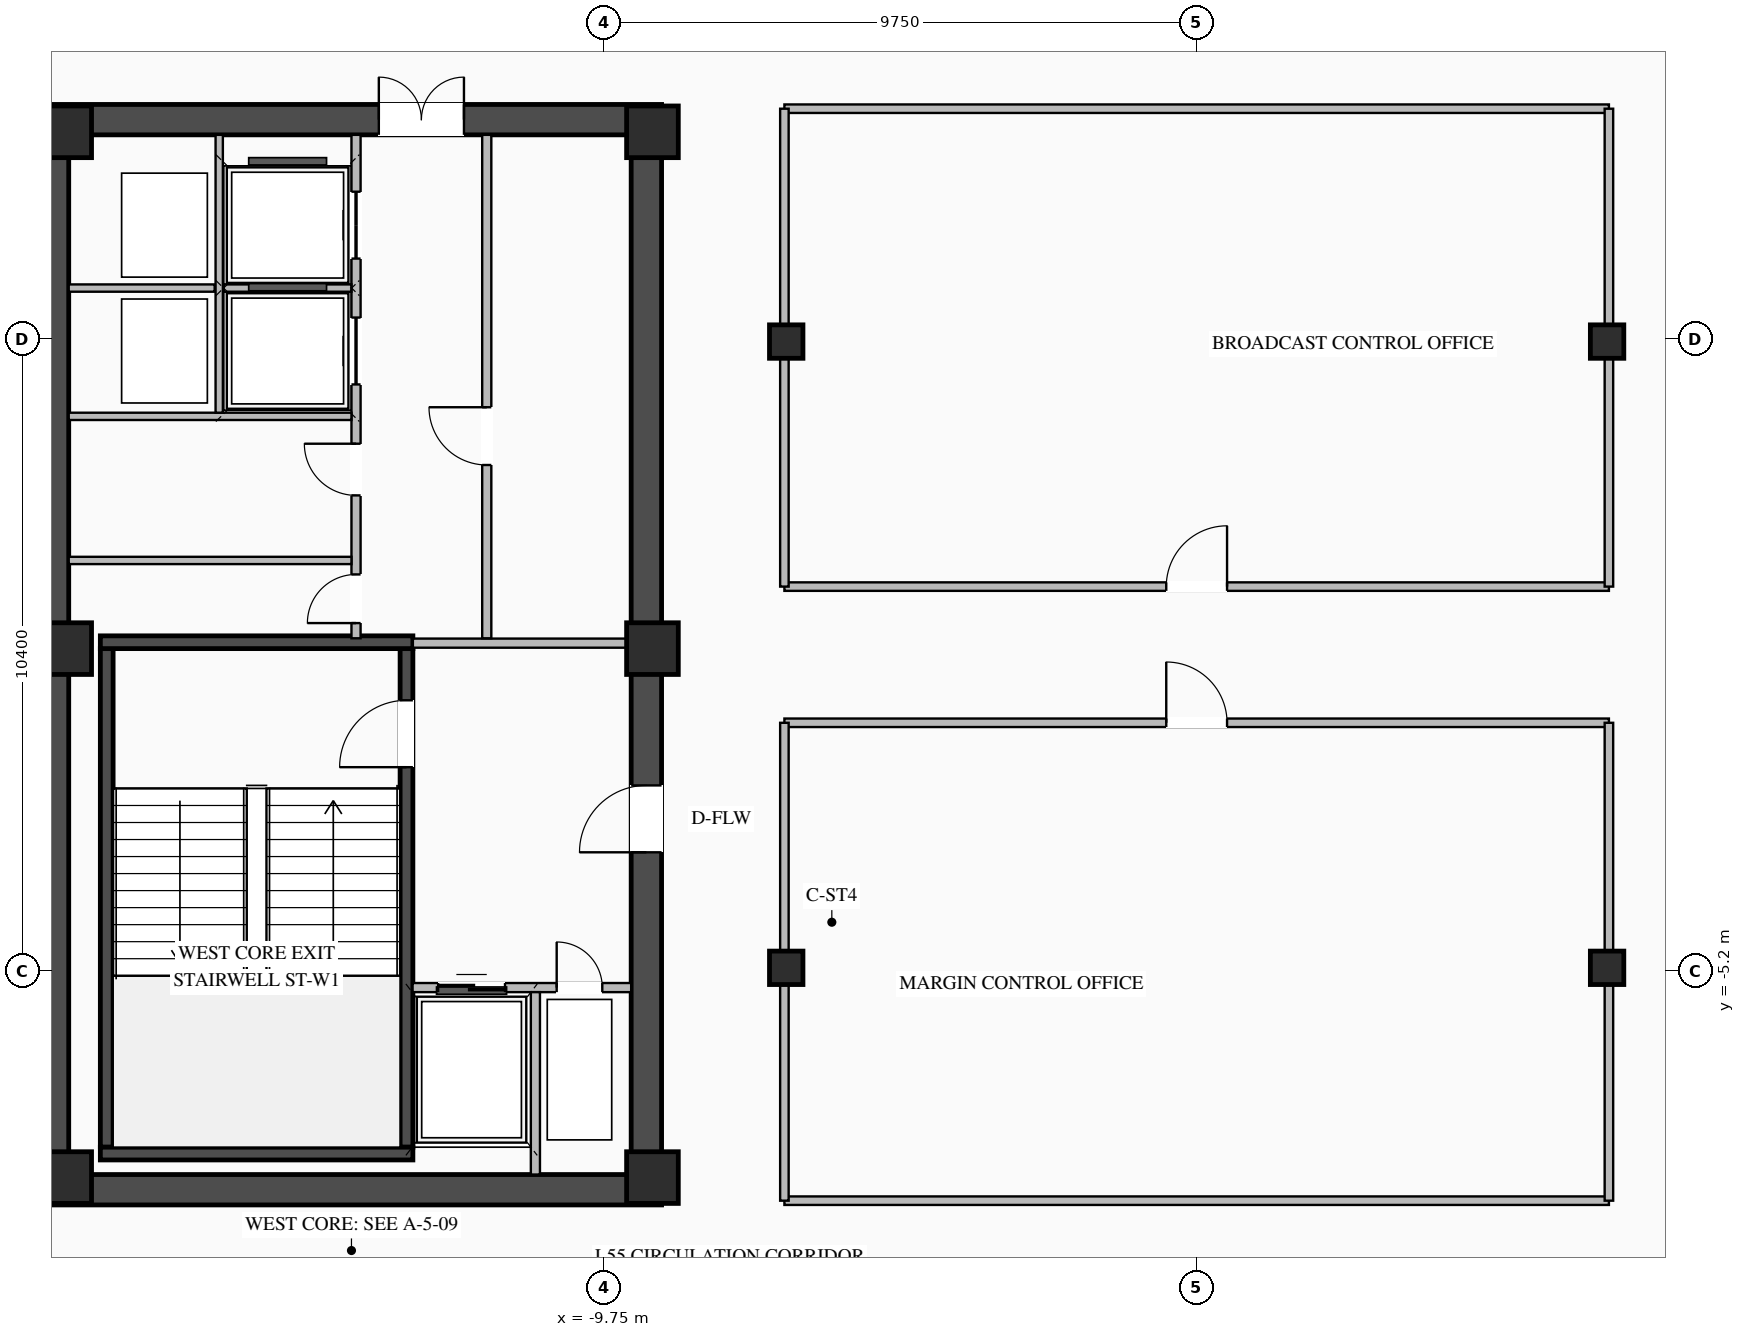
"""IFC4 building model, lengths in metres.
Left out: names, types, materials, properties, quantities, classifications, styles, units other than length and angle.
Written with IfcOpenShell. Run it as: python <this file> out.ifc"""

import sys

from ifc_helpers import new_model, si_unit, direction, frame, frame_2d, origin, origin_2d, place, context, subcontext, project, spatial, rectangle, i_section, extrude, element, fill, save


model = new_model("IFC4")
c1 = context("Model", 3, precision=1e-05, world=origin(), true_north=direction((0.0, 1.0)))
c2 = subcontext(c1, "Body", "Model", "MODEL_VIEW")
j1 = project(units=[si_unit("LENGTHUNIT", "METRE"), si_unit("PLANEANGLEUNIT", "RADIAN")], contexts=[c1])
p1 = place(None, origin())
s1 = spatial("IfcSite", under=j1, at=p1, CompositionType="ELEMENT")
p2 = place(p1, origin())
s2 = spatial("IfcBuilding", under=s1, at=p2, CompositionType="ELEMENT")
p3 = place(p2, frame((0.0, 0.0, 204.3)))
s3 = spatial("IfcBuildingStorey", under=s2, at=p3, CompositionType="ELEMENT", Elevation=204.3)
p4 = place(p3, frame((-19.05, -8.8, 0.0), z_axis=(0.0, 0.0, 1.0), x_axis=(1.0, 0.0, 0.0)))
e1 = element("IfcWall", 1, at=p4, inside=s3, PredefinedType="SHEAR", context=c2, shape_type="SweptSolid", body=[
    extrude(rectangle(XDim=10.25, YDim=0.5, at=frame_2d((5.125, 0.0))), origin(), (0.0, 0.0, 1.0), 4.02),
])
p5 = place(p3, frame((-19.05, 8.8, 0.0), z_axis=(0.0, 0.0, 1.0), x_axis=(1.0, 0.0, 0.0)))
e2 = element("IfcWall", 2, at=p5, inside=s3, PredefinedType="SHEAR", context=c2, shape_type="SweptSolid", body=[
    extrude(rectangle(XDim=10.25, YDim=0.5, at=frame_2d((5.125, 0.0))), origin(), (0.0, 0.0, 1.0), 4.02),
])
p6 = place(p5, frame((5.6, 0.0, 0.0)))
e3 = element("IfcOpeningElement", 3, at=p6, cuts=e2, PredefinedType="OPENING", context=c2, shape_type="SweptSolid", body=[
    extrude(rectangle(XDim=1.4, YDim=2.05, at=frame_2d((0.7, 1.025))), frame((0.0, 0.26, 0.0), z_axis=(0.0, -1.0, 0.0), x_axis=(1.0, 0.0, 0.0)), (0.0, 0.0, 1.0), 0.52),
])
p7 = place(p3, frame((-18.8, -8.55, 0.0), z_axis=(0.0, 0.0, 1.0), x_axis=(0.0, 1.0, 0.0)))
e4 = element("IfcWall", 4, at=p7, inside=s3, PredefinedType="SHEAR", context=c2, shape_type="SweptSolid", body=[
    extrude(rectangle(XDim=17.1, YDim=0.5, at=frame_2d((8.55, 0.0))), origin(), (0.0, 0.0, 1.0), 4.02),
])
p8 = place(p3, frame((-9.05, -8.55, 0.0), z_axis=(0.0, 0.0, 1.0), x_axis=(0.0, 1.0, 0.0)))
e5 = element("IfcWall", 5, at=p8, inside=s3, PredefinedType="SHEAR", context=c2, shape_type="SweptSolid", body=[
    extrude(rectangle(XDim=17.1, YDim=0.5, at=frame_2d((8.55, 0.0))), origin(), (0.0, 0.0, 1.0), 4.02),
])
p9 = place(p8, frame((5.3, 0.0, 0.0)))
e6 = element("IfcOpeningElement", 6, at=p9, cuts=e5, PredefinedType="OPENING", context=c2, shape_type="SweptSolid", body=[
    extrude(rectangle(XDim=1.1, YDim=2.08, at=frame_2d((0.55, 1.04))), frame((0.0, 0.26, 0.0), z_axis=(0.0, -1.0, 0.0), x_axis=(1.0, 0.0, 0.0)), (0.0, 0.0, 1.0), 0.52),
])
p10 = place(p3, frame((-12.995, -8.1, 0.0), z_axis=(0.0, 0.0, 1.0), x_axis=(0.0, 1.0, 0.0)))
e7 = element("IfcWall", 7, at=p10, inside=s3, PredefinedType="SHEAR", context=c2, shape_type="SweptSolid", body=[
    extrude(rectangle(XDim=8.2, YDim=0.21, at=frame_2d((4.1, 0.0))), origin(), (0.0, 0.0, 1.0), 4.02),
])
p11 = place(p10, frame((6.25, 0.0, 0.0)))
e8 = element("IfcOpeningElement", 8, at=p11, cuts=e7, PredefinedType="OPENING", context=c2, shape_type="SweptSolid", body=[
    extrude(rectangle(XDim=1.1, YDim=2.15, at=frame_2d((0.55, 1.075))), frame((0.0, 0.115, 0.0), z_axis=(0.0, -1.0, 0.0), x_axis=(1.0, 0.0, 0.0)), (0.0, 0.0, 1.0), 0.23),
])
p12 = place(p3, frame((-17.925, -8.1, 0.0), z_axis=(0.0, 0.0, 1.0), x_axis=(0.0, 1.0, 0.0)))
e9 = element("IfcWall", 9, at=p12, inside=s3, PredefinedType="SHEAR", context=c2, shape_type="SweptSolid", body=[
    extrude(rectangle(XDim=8.2, YDim=0.21, at=frame_2d((4.1, 0.0))), origin(), (0.0, 0.0, 1.0), 4.02),
])
for number, where, z_axis, x_axis in (
    (10, (-18.03, -8.205, 0.0), (0.0, 0.0, 1.0), (1.0, 0.0, 0.0)),
    (11, (-12.89, 0.205, 0.0), (0.0, 0.0, 1.0), (-1.0, 0.0, 0.0)),
):
    element("IfcWall", number, at=place(p3, frame(where, z_axis=z_axis, x_axis=x_axis)), inside=s3, PredefinedType="SHEAR", context=c2, shape_type="SweptSolid", body=[
        extrude(rectangle(XDim=5.14, YDim=0.21, at=frame_2d((2.57, 0.0))), origin(), (0.0, 0.0, 1.0), 4.02),
    ])
for number, where, z_axis, x_axis in (
    (12, (-8.95, -8.6, 0.0), (0.0, 0.0, 1.0), (1.0, 0.0, 0.0)),
    (13, (-8.95, 0.1, 0.0), (0.0, 0.0, 1.0), (1.0, 0.0, 0.0)),
    (14, (-8.95, 8.6, 0.0), (0.0, 0.0, 1.0), (1.0, 0.0, 0.0)),
    (15, (-18.6, -8.6, 0.0), (0.0, 0.0, 1.0), (1.0, 0.0, 0.0)),
    (16, (-18.6, 0.1, 0.0), (0.0, 0.0, 1.0), (1.0, 0.0, 0.0)),
    (17, (-18.6, 8.6, 0.0), (0.0, 0.0, 1.0), (1.0, 0.0, 0.0)),
):
    element("IfcColumn", number, at=place(p3, frame(where, z_axis=z_axis, x_axis=x_axis)), inside=s3, PredefinedType="COLUMN", context=c2, shape_type="SweptSolid", body=[
        extrude(rectangle(XDim=0.85, YDim=0.85, at=origin_2d()), origin(), (0.0, 0.0, 1.0), 4.2),
    ])
for number, where, z_axis, x_axis in (
    (18, (-6.75, -5.15, 0.0), (0.0, 0.0, 1.0), (1.0, 0.0, 0.0)),
    (19, (-6.75, 5.15, 0.0), (0.0, 0.0, 1.0), (1.0, 0.0, 0.0)),
    (20, (6.75, -5.15, 0.0), (0.0, 0.0, 1.0), (1.0, 0.0, 0.0)),
    (21, (6.75, 5.15, 0.0), (0.0, 0.0, 1.0), (1.0, 0.0, 0.0)),
):
    element("IfcColumn", number, at=place(p3, frame(where, z_axis=z_axis, x_axis=x_axis)), inside=s3, PredefinedType="COLUMN", context=c2, shape_type="SweptSolid", body=[
        extrude(i_section(OverallWidth=0.55, OverallDepth=0.55, WebThickness=0.024, FlangeThickness=0.036, at=origin_2d()), origin(), (0.0, 0.0, 1.0), 4.2),
    ])
p13 = place(p3, frame((-12.895, -5.475, 0.0), z_axis=(0.0, 0.0, 1.0), x_axis=(1.0, 0.0, 0.0)))
e22 = element("IfcWall", 22, at=p13, inside=s3, PredefinedType="STANDARD", context=c2, shape_type="SweptSolid", body=[
    extrude(rectangle(XDim=3.595, YDim=0.15, at=frame_2d((1.797, 0.0))), origin(), (0.0, 0.0, 1.0), 4.0),
])
p14 = place(p13, frame((0.42, 0.0, 0.0)))
e23 = element("IfcOpeningElement", 23, at=p14, cuts=e22, PredefinedType="OPENING", context=c2, shape_type="SweptSolid", body=[
    extrude(rectangle(XDim=1.1, YDim=2.15, at=frame_2d((0.55, 1.075))), frame((0.0, 0.085, 0.0), z_axis=(0.0, -1.0, 0.0), x_axis=(1.0, 0.0, 0.0)), (0.0, 0.0, 1.0), 0.17),
])
p15 = place(p13, frame((2.37, 0.0, 0.0)))
e24 = element("IfcOpeningElement", 24, at=p15, cuts=e22, PredefinedType="OPENING", context=c2, shape_type="SweptSolid", body=[
    extrude(rectangle(XDim=0.75, YDim=2.05, at=frame_2d((0.375, 1.025))), frame((0.0, 0.085, 0.0), z_axis=(0.0, -1.0, 0.0), x_axis=(1.0, 0.0, 0.0)), (0.0, 0.0, 1.0), 0.17),
])
p16 = place(p3, frame((-10.875, -8.55, 0.0), z_axis=(0.0, 0.0, 1.0), x_axis=(0.0, 1.0, 0.0)))
e25 = element("IfcWall", 25, at=p16, inside=s3, PredefinedType="STANDARD", context=c2, shape_type="SweptSolid", body=[
    extrude(rectangle(XDim=3.0, YDim=0.15, at=frame_2d((1.5, 0.0))), origin(), (0.0, 0.0, 1.0), 4.0),
])
p17 = place(p3, frame((-12.89, 0.19, 0.0), z_axis=(0.0, 0.0, 1.0), x_axis=(1.0, 0.0, 0.0)))
e26 = element("IfcWall", 26, at=p17, inside=s3, PredefinedType="STANDARD", context=c2, shape_type="SweptSolid", body=[
    extrude(rectangle(XDim=3.59, YDim=0.15, at=frame_2d((1.795, 0.0))), origin(), (0.0, 0.0, 1.0), 3.395),
])
p18 = place(p3, frame((-11.675, 0.27, 0.0), z_axis=(0.0, 0.0, 1.0), x_axis=(0.0, 1.0, 0.0)))
e27 = element("IfcWall", 27, at=p18, inside=s3, PredefinedType="STANDARD", context=c2, shape_type="SweptSolid", body=[
    extrude(rectangle(XDim=8.28, YDim=0.15, at=frame_2d((4.14, 0.0))), origin(), (0.0, 0.0, 1.0), 4.0),
])
p19 = place(p18, frame((2.85, 0.0, 0.0)))
e28 = element("IfcOpeningElement", 28, at=p19, cuts=e27, PredefinedType="OPENING", context=c2, shape_type="SweptSolid", body=[
    extrude(rectangle(XDim=0.95, YDim=2.05, at=frame_2d((0.475, 1.025))), frame((0.0, 0.085, 0.0), z_axis=(0.0, -1.0, 0.0), x_axis=(1.0, 0.0, 0.0)), (0.0, 0.0, 1.0), 0.17),
])
p20 = place(p3, frame((-13.825, 0.27, 0.0), z_axis=(0.0, 0.0, 1.0), x_axis=(0.0, 1.0, 0.0)))
e29 = element("IfcWall", 29, at=p20, inside=s3, PredefinedType="STANDARD", context=c2, shape_type="SweptSolid", body=[
    extrude(rectangle(XDim=8.28, YDim=0.15, at=frame_2d((4.14, 0.0))), origin(), (0.0, 0.0, 1.0), 4.0),
])
p21 = place(p20, frame((4.175, 0.0, 0.0)))
e30 = element("IfcOpeningElement", 30, at=p21, cuts=e29, PredefinedType="OPENING", context=c2, shape_type="SweptSolid", body=[
    extrude(rectangle(XDim=1.1, YDim=2.1, at=frame_2d((0.55, 1.05))), frame((0.0, 0.085, 0.0), z_axis=(0.0, -1.0, 0.0), x_axis=(1.0, 0.0, 0.0)), (0.0, 0.0, 1.0), 0.17),
])
p22 = place(p20, frame((6.245, 0.0, 0.0)))
e31 = element("IfcOpeningElement", 31, at=p22, cuts=e29, PredefinedType="OPENING", context=c2, shape_type="SweptSolid", body=[
    extrude(rectangle(XDim=1.1, YDim=2.1, at=frame_2d((0.55, 1.05))), frame((0.0, 0.085, 0.0), z_axis=(0.0, -1.0, 0.0), x_axis=(1.0, 0.0, 0.0)), (0.0, 0.0, 1.0), 0.17),
])
p23 = place(p20, frame((0.25, 0.0, 0.0)))
e32 = element("IfcOpeningElement", 32, at=p23, cuts=e29, PredefinedType="OPENING", context=c2, shape_type="SweptSolid", body=[
    extrude(rectangle(XDim=0.8, YDim=2.05, at=frame_2d((0.4, 1.025))), frame((0.0, 0.085, 0.0), z_axis=(0.0, -1.0, 0.0), x_axis=(1.0, 0.0, 0.0)), (0.0, 0.0, 1.0), 0.17),
])
p24 = place(p20, frame((2.35, 0.0, 0.0)))
e33 = element("IfcOpeningElement", 33, at=p24, cuts=e29, PredefinedType="OPENING", context=c2, shape_type="SweptSolid", body=[
    extrude(rectangle(XDim=0.85, YDim=2.05, at=frame_2d((0.425, 1.025))), frame((0.0, 0.085, 0.0), z_axis=(0.0, -1.0, 0.0), x_axis=(1.0, 0.0, 0.0)), (0.0, 0.0, 1.0), 0.17),
])
p25 = place(p3, frame((-18.55, 3.92, 0.0), z_axis=(0.0, 0.0, 1.0), x_axis=(1.0, 0.0, 0.0)))
e34 = element("IfcWall", 34, at=p25, inside=s3, PredefinedType="STANDARD", context=c2, shape_type="SweptSolid", body=[
    extrude(rectangle(XDim=4.65, YDim=0.12, at=frame_2d((2.325, 0.0))), origin(), (0.0, 0.0, 1.0), 4.0),
])
p26 = place(p3, frame((-18.55, 6.03, 0.0), z_axis=(0.0, 0.0, 1.0), x_axis=(1.0, 0.0, 0.0)))
e35 = element("IfcWall", 35, at=p26, inside=s3, PredefinedType="STANDARD", context=c2, shape_type="SweptSolid", body=[
    extrude(rectangle(XDim=2.4, YDim=0.12, at=frame_2d((1.2, 0.0))), origin(), (0.0, 0.0, 1.0), 4.0),
])
p27 = place(p3, frame((-16.075, 3.98, 0.0), z_axis=(0.0, 0.0, 1.0), x_axis=(0.0, 1.0, 0.0)))
e36 = element("IfcWall", 36, at=p27, inside=s3, PredefinedType="STANDARD", context=c2, shape_type="SweptSolid", body=[
    extrude(rectangle(XDim=4.57, YDim=0.12, at=frame_2d((2.285, 0.0))), origin(), (0.0, 0.0, 1.0), 4.0),
])
p28 = place(p3, frame((-16.0, 6.03, 0.0), z_axis=(0.0, 0.0, 1.0), x_axis=(1.0, 0.0, 0.0)))
e37 = element("IfcWall", 37, at=p28, inside=s3, PredefinedType="STANDARD", context=c2, shape_type="SweptSolid", body=[
    extrude(rectangle(XDim=2.1, YDim=0.12, at=frame_2d((1.05, 0.0))), origin(), (0.0, 0.0, 1.0), 4.0),
])
p29 = place(p3, frame((-18.55, 1.55, 0.0), z_axis=(0.0, 0.0, 1.0), x_axis=(1.0, 0.0, 0.0)))
e38 = element("IfcWall", 38, at=p29, inside=s3, PredefinedType="STANDARD", context=c2, shape_type="SweptSolid", body=[
    extrude(rectangle(XDim=4.65, YDim=0.12, at=frame_2d((2.325, 0.0))), origin(), (0.0, 0.0, 1.0), 4.0),
])
p30 = place(p3, frame((-6.78, 1.12, 0.0), z_axis=(0.0, 0.0, 1.0), x_axis=(1.0, 0.0, 0.0)))
e39 = element("IfcWall", 39, at=p30, inside=s3, PredefinedType="STANDARD", context=c2, shape_type="SweptSolid", body=[
    extrude(rectangle(XDim=13.56, YDim=0.14, at=frame_2d((6.78, 0.0))), origin(), (0.0, 0.0, 1.0), 4.0),
])
p31 = place(p30, frame((6.28, 0.0, 0.0)))
e40 = element("IfcOpeningElement", 40, at=p31, cuts=e39, PredefinedType="OPENING", context=c2, shape_type="SweptSolid", body=[
    extrude(rectangle(XDim=1.0, YDim=2.08, at=frame_2d((0.5, 1.04))), frame((0.0, 0.08, 0.0), z_axis=(0.0, -1.0, 0.0), x_axis=(1.0, 0.0, 0.0)), (0.0, 0.0, 1.0), 0.16),
])
p32 = place(p3, frame((-6.78, 8.98, 0.0), z_axis=(0.0, 0.0, 1.0), x_axis=(1.0, 0.0, 0.0)))
e41 = element("IfcWall", 41, at=p32, inside=s3, PredefinedType="STANDARD", context=c2, shape_type="SweptSolid", body=[
    extrude(rectangle(XDim=13.56, YDim=0.14, at=frame_2d((6.78, 0.0))), origin(), (0.0, 0.0, 1.0), 4.0),
])
for number, where, z_axis, x_axis in (
    (42, (-6.78, 1.12, 0.0), (0.0, 0.0, 1.0), (0.0, 1.0, 0.0)),
    (43, (6.78, 1.12, 0.0), (0.0, 0.0, 1.0), (0.0, 1.0, 0.0)),
):
    element("IfcWall", number, at=place(p3, frame(where, z_axis=z_axis, x_axis=x_axis)), inside=s3, PredefinedType="STANDARD", context=c2, shape_type="SweptSolid", body=[
        extrude(rectangle(XDim=7.86, YDim=0.14, at=frame_2d((3.93, 0.0))), origin(), (0.0, 0.0, 1.0), 3.395),
    ])
p33 = place(p3, frame((-6.78, -1.12, 0.0), z_axis=(0.0, 0.0, 1.0), x_axis=(1.0, 0.0, 0.0)))
e44 = element("IfcWall", 44, at=p33, inside=s3, PredefinedType="STANDARD", context=c2, shape_type="SweptSolid", body=[
    extrude(rectangle(XDim=13.56, YDim=0.14, at=frame_2d((6.78, 0.0))), origin(), (0.0, 0.0, 1.0), 4.0),
])
p34 = place(p33, frame((6.28, 0.0, 0.0)))
e45 = element("IfcOpeningElement", 45, at=p34, cuts=e44, PredefinedType="OPENING", context=c2, shape_type="SweptSolid", body=[
    extrude(rectangle(XDim=1.0, YDim=2.08, at=frame_2d((0.5, 1.04))), frame((0.0, 0.08, 0.0), z_axis=(0.0, -1.0, 0.0), x_axis=(1.0, 0.0, 0.0)), (0.0, 0.0, 1.0), 0.16),
])
p35 = place(p3, frame((-6.78, -8.98, 0.0), z_axis=(0.0, 0.0, 1.0), x_axis=(1.0, 0.0, 0.0)))
e46 = element("IfcWall", 46, at=p35, inside=s3, PredefinedType="STANDARD", context=c2, shape_type="SweptSolid", body=[
    extrude(rectangle(XDim=13.56, YDim=0.14, at=frame_2d((6.78, 0.0))), origin(), (0.0, 0.0, 1.0), 4.0),
])
for number, where, z_axis, x_axis in (
    (47, (-6.78, -8.98, 0.0), (0.0, 0.0, 1.0), (0.0, 1.0, 0.0)),
    (48, (6.78, -8.98, 0.0), (0.0, 0.0, 1.0), (0.0, 1.0, 0.0)),
):
    element("IfcWall", number, at=place(p3, frame(where, z_axis=z_axis, x_axis=x_axis)), inside=s3, PredefinedType="STANDARD", context=c2, shape_type="SweptSolid", body=[
        extrude(rectangle(XDim=7.86, YDim=0.14, at=frame_2d((3.93, 0.0))), origin(), (0.0, 0.0, 1.0), 3.395),
    ])
p36 = place(p11, origin())
e49 = element("IfcDoor", 49, at=p36, inside=s3, OperationType="SINGLE_SWING_LEFT", PredefinedType="DOOR", context=c2, shape_type="SweptSolid", body=[
    extrude(rectangle(XDim=1.1, YDim=2.15, at=frame_2d((0.55, 1.075))), frame((0.0, 0.025, 0.0), z_axis=(0.0, -1.0, 0.0), x_axis=(1.0, 0.0, 0.0)), (0.0, 0.0, 1.0), 0.05),
])
fill(e8, e49)
p37 = place(p14, origin())
e50 = element("IfcDoor", 50, at=p37, inside=s3, OperationType="DOUBLE_DOOR_SLIDING", PredefinedType="DOOR", context=c2, shape_type="SweptSolid", body=[
    extrude(rectangle(XDim=1.1, YDim=2.15, at=frame_2d((0.55, 1.075))), frame((0.0, 0.025, 0.0), z_axis=(0.0, -1.0, 0.0), x_axis=(1.0, 0.0, 0.0)), (0.0, 0.0, 1.0), 0.05),
])
fill(e23, e50)
p38 = place(p15, origin())
e51 = element("IfcDoor", 51, at=p38, inside=s3, OperationType="SINGLE_SWING_LEFT", PredefinedType="DOOR", context=c2, shape_type="SweptSolid", body=[
    extrude(rectangle(XDim=0.75, YDim=2.05, at=frame_2d((0.375, 1.025))), frame((0.0, 0.025, 0.0), z_axis=(0.0, -1.0, 0.0), x_axis=(1.0, 0.0, 0.0)), (0.0, 0.0, 1.0), 0.05),
])
fill(e24, e51)
p39 = place(p9, origin())
e52 = element("IfcDoor", 52, at=p39, inside=s3, OperationType="SINGLE_SWING_LEFT", PredefinedType="DOOR", context=c2, shape_type="SweptSolid", body=[
    extrude(rectangle(XDim=1.1, YDim=2.08, at=frame_2d((0.55, 1.04))), frame((0.0, 0.205, 0.0), z_axis=(0.0, -1.0, 0.0), x_axis=(1.0, 0.0, 0.0)), (0.0, 0.0, 1.0), 0.05),
])
fill(e6, e52)
p40 = place(p6, origin())
e53 = element("IfcDoor", 53, at=p40, inside=s3, OperationType="DOUBLE_DOOR_SINGLE_SWING", PredefinedType="DOOR", context=c2, shape_type="SweptSolid", body=[
    extrude(rectangle(XDim=1.4, YDim=2.05, at=frame_2d((0.7, 1.025))), frame((0.0, 0.195, 0.0), z_axis=(0.0, -1.0, 0.0), x_axis=(1.0, 0.0, 0.0)), (0.0, 0.0, 1.0), 0.05),
])
fill(e3, e53)
p41 = place(p19, origin())
e54 = element("IfcDoor", 54, at=p41, inside=s3, OperationType="SINGLE_SWING_RIGHT", PredefinedType="DOOR", context=c2, shape_type="SweptSolid", body=[
    extrude(rectangle(XDim=0.95, YDim=2.05, at=frame_2d((0.475, 1.025))), frame((0.0, 0.025, 0.0), z_axis=(0.0, -1.0, 0.0), x_axis=(1.0, 0.0, 0.0)), (0.0, 0.0, 1.0), 0.05),
])
fill(e28, e54)
p42 = place(p21, origin())
e55 = element("IfcDoor", 55, at=p42, inside=s3, OperationType="DOUBLE_DOOR_SLIDING", PredefinedType="DOOR", context=c2, shape_type="SweptSolid", body=[
    extrude(rectangle(XDim=1.1, YDim=2.1, at=frame_2d((0.55, 1.05))), frame((0.0, 0.025, 0.0), z_axis=(0.0, -1.0, 0.0), x_axis=(1.0, 0.0, 0.0)), (0.0, 0.0, 1.0), 0.05),
])
fill(e30, e55)
p43 = place(p22, origin())
e56 = element("IfcDoor", 56, at=p43, inside=s3, OperationType="DOUBLE_DOOR_SLIDING", PredefinedType="DOOR", context=c2, shape_type="SweptSolid", body=[
    extrude(rectangle(XDim=1.1, YDim=2.1, at=frame_2d((0.55, 1.05))), frame((0.0, 0.025, 0.0), z_axis=(0.0, -1.0, 0.0), x_axis=(1.0, 0.0, 0.0)), (0.0, 0.0, 1.0), 0.05),
])
fill(e31, e56)
p44 = place(p23, origin())
e57 = element("IfcDoor", 57, at=p44, inside=s3, OperationType="SINGLE_SWING_LEFT", PredefinedType="DOOR", context=c2, shape_type="SweptSolid", body=[
    extrude(rectangle(XDim=0.8, YDim=2.05, at=frame_2d((0.4, 1.025))), frame((0.0, 0.025, 0.0), z_axis=(0.0, -1.0, 0.0), x_axis=(1.0, 0.0, 0.0)), (0.0, 0.0, 1.0), 0.05),
])
fill(e32, e57)
p45 = place(p24, origin())
e58 = element("IfcDoor", 58, at=p45, inside=s3, OperationType="SINGLE_SWING_RIGHT", PredefinedType="DOOR", context=c2, shape_type="SweptSolid", body=[
    extrude(rectangle(XDim=0.85, YDim=2.05, at=frame_2d((0.425, 1.025))), frame((0.0, 0.025, 0.0), z_axis=(0.0, -1.0, 0.0), x_axis=(1.0, 0.0, 0.0)), (0.0, 0.0, 1.0), 0.05),
])
fill(e33, e58)
p46 = place(p31, origin())
e59 = element("IfcDoor", 59, at=p46, inside=s3, OperationType="SINGLE_SWING_RIGHT", PredefinedType="DOOR", context=c2, shape_type="SweptSolid", body=[
    extrude(rectangle(XDim=1.0, YDim=2.08, at=frame_2d((0.5, 1.04))), frame((0.0, 0.025, 0.0), z_axis=(0.0, -1.0, 0.0), x_axis=(1.0, 0.0, 0.0)), (0.0, 0.0, 1.0), 0.05),
])
fill(e40, e59)
p47 = place(p34, origin())
e60 = element("IfcDoor", 60, at=p47, inside=s3, OperationType="SINGLE_SWING_LEFT", PredefinedType="DOOR", context=c2, shape_type="SweptSolid", body=[
    extrude(rectangle(XDim=1.0, YDim=2.08, at=frame_2d((0.5, 1.04))), frame((0.0, 0.025, 0.0), z_axis=(0.0, -1.0, 0.0), x_axis=(1.0, 0.0, 0.0)), (0.0, 0.0, 1.0), 0.05),
])
fill(e45, e60)
save(model, sys.argv[1])
